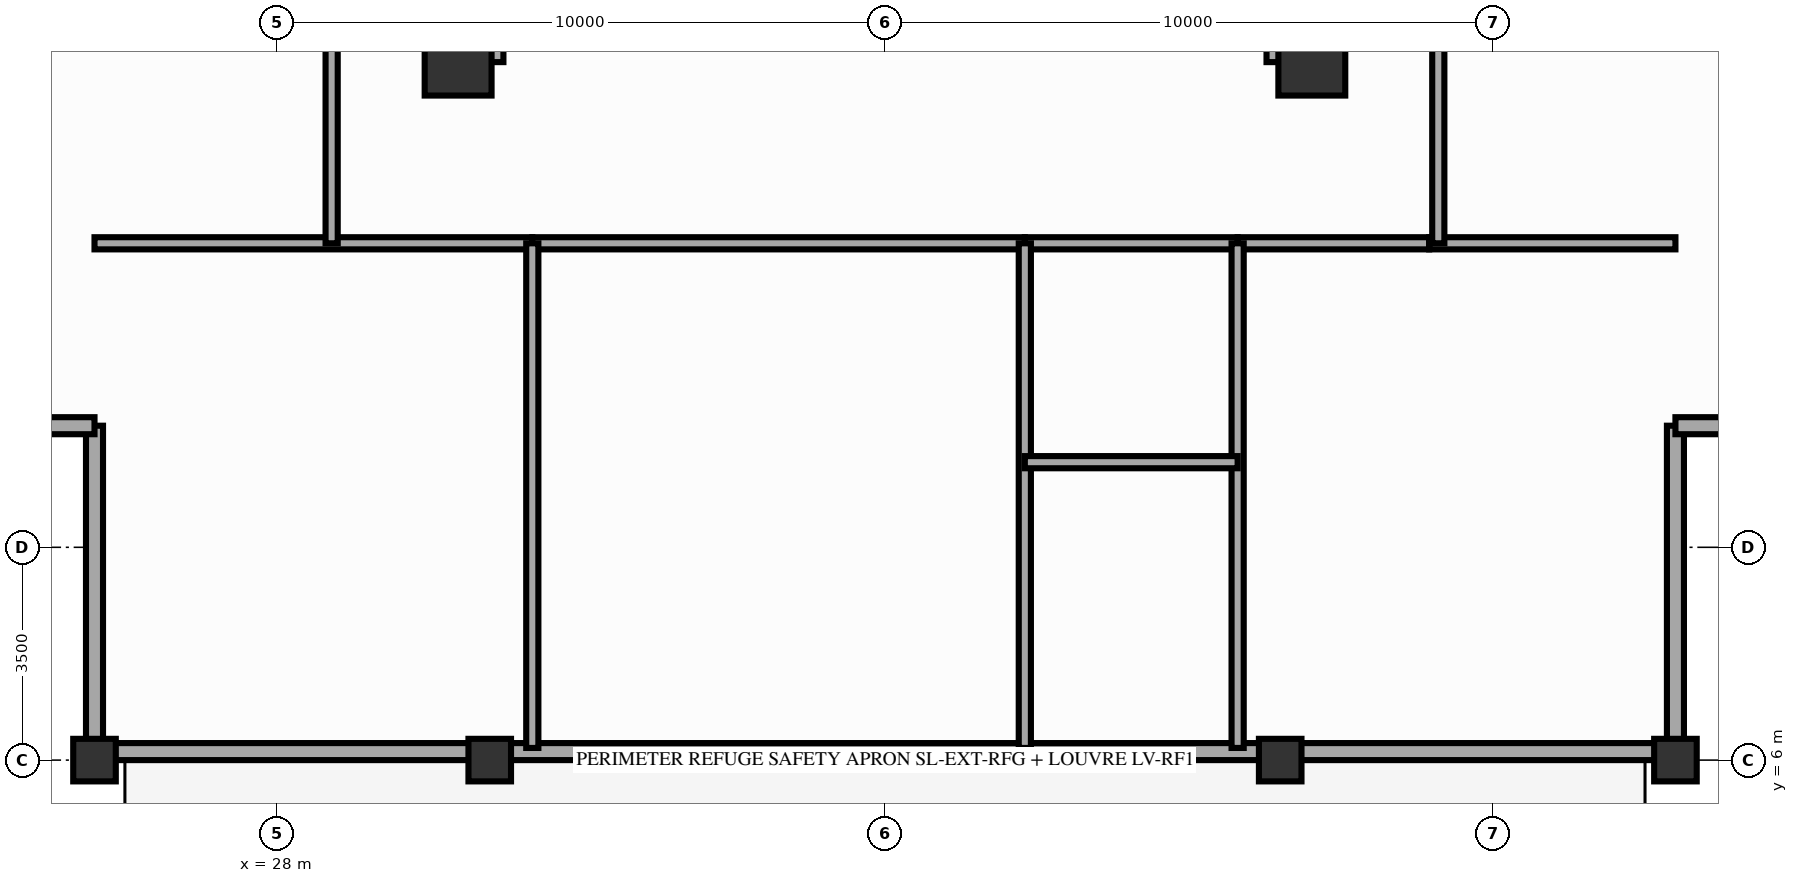
"""IFC4 building model, lengths in metres.
Left out: names, types, materials, properties, quantities, classifications, styles, units other than length and angle.
Written with IfcOpenShell. Run it as: python <this file> out.ifc"""

import sys

from ifc_helpers import new_model, si_unit, direction, frame, frame_2d, origin, origin_2d, place, context, subcontext, project, spatial, rectangle, extrude, source, transform, mapped, element, fill, save


model = new_model("IFC4")
c1 = context("Model", 3, precision=1e-05, world=origin(), true_north=direction((0.0, 1.0)))
c2 = subcontext(c1, "Body", "Model", "MODEL_VIEW")
j1 = project(units=[si_unit("LENGTHUNIT", "METRE"), si_unit("PLANEANGLEUNIT", "RADIAN")], contexts=[c1])
p1 = place(None, origin())
s1 = spatial("IfcSite", under=j1, at=p1, CompositionType="ELEMENT")
p2 = place(p1, origin())
s2 = spatial("IfcBuilding", under=s1, at=p2, CompositionType="ELEMENT")
p3 = place(p2, frame((0.0, 0.0, 206.5)))
s3 = spatial("IfcBuildingStorey", under=s2, at=p3, CompositionType="ELEMENT", Elevation=206.5)
p4 = place(p3, frame((31.5, 17.48, 0.0), z_axis=(0.0, 0.0, 1.0), x_axis=(0.0, 1.0, 0.0)))
e1 = element("IfcWall", 1, at=p4, inside=s3, PredefinedType="SHEAR", context=c2, shape_type="SweptSolid", body=[
    extrude(rectangle(XDim=19.04, YDim=0.45, at=frame_2d((9.52, 0.0))), origin(), (0.0, 0.0, 1.0), 3.8),
])
p5 = place(p4, frame((6.32, 0.0, 0.0)))
e2 = element("IfcOpeningElement", 2, at=p5, cuts=e1, PredefinedType="OPENING", context=c2, shape_type="SweptSolid", body=[
    extrude(rectangle(XDim=1.1, YDim=2.15, at=frame_2d((0.55, 1.075))), frame((0.0, 0.237, 0.0), z_axis=(0.0, -1.0, 0.0), x_axis=(1.0, 0.0, 0.0)), (0.0, 0.0, 1.0), 0.474),
])
p6 = place(p3, frame((44.5, 17.48, 0.0), z_axis=(0.0, 0.0, 1.0), x_axis=(0.0, 1.0, 0.0)))
e3 = element("IfcWall", 3, at=p6, inside=s3, PredefinedType="SHEAR", context=c2, shape_type="SweptSolid", body=[
    extrude(rectangle(XDim=19.04, YDim=0.45, at=frame_2d((9.52, 0.0))), origin(), (0.0, 0.0, 1.0), 3.8),
])
p7 = place(p6, frame((12.67, 0.0, 0.0), z_axis=(0.0, 0.0, 1.0), x_axis=(-1.0, 0.0, 0.0)))
e4 = element("IfcOpeningElement", 4, at=p7, cuts=e3, PredefinedType="OPENING", context=c2, shape_type="SweptSolid", body=[
    extrude(rectangle(XDim=1.1, YDim=2.15, at=frame_2d((0.55, 1.075))), frame((0.0, 0.237, 0.0), z_axis=(0.0, -1.0, 0.0), x_axis=(1.0, 0.0, 0.0)), (0.0, 0.0, 1.0), 0.474),
])
m1 = source(origin(), c2, "Body", "SweptSolid", [
    extrude(rectangle(XDim=1.1, YDim=1.1, at=origin_2d()), origin(), (0.0, 0.0, 1.0), 3.8),
])
for number, where, z_axis, x_axis in (
    (5, (30.98, 17.48, 0.0), (0.0, 0.0, 1.0), (1.0, 0.0, 0.0)),
    (6, (45.02, 17.48, 0.0), (0.0, 0.0, 1.0), (1.0, 0.0, 0.0)),
):
    element("IfcColumn", number, at=place(p3, frame(where, z_axis=z_axis, x_axis=x_axis)), inside=s3, PredefinedType="COLUMN", context=c2, shape_type="MappedRepresentation", body=[
        mapped(m1, transform((0.0, 0.0, 0.0), scale=1.0)),
    ])
m2 = source(origin(), c2, "Body", "SweptSolid", [
    extrude(rectangle(XDim=0.7, YDim=0.7, at=origin_2d()), origin(), (0.0, 0.0, 1.0), 3.8),
])
for number, where, z_axis, x_axis in (
    (7, (25.0, 6.0, 0.0), (0.0, 0.0, 1.0), (1.0, 0.0, 0.0)),
    (8, (31.5, 6.0, 0.0), (0.0, 0.0, 1.0), (1.0, 0.0, 0.0)),
    (9, (44.5, 6.0, 0.0), (0.0, 0.0, 1.0), (1.0, 0.0, 0.0)),
    (10, (51.0, 6.0, 0.0), (0.0, 0.0, 1.0), (1.0, 0.0, 0.0)),
):
    element("IfcColumn", number, at=place(p3, frame(where, z_axis=z_axis, x_axis=x_axis)), inside=s3, PredefinedType="COLUMN", context=c2, shape_type="MappedRepresentation", body=[
        mapped(m2, transform((0.0, 0.0, 0.0), scale=1.0)),
    ])
p8 = place(p3, frame((25.0, 6.14, 0.0), z_axis=(0.0, 0.0, 1.0), x_axis=(1.0, 0.0, 0.0)))
e11 = element("IfcWall", 11, at=p8, inside=s3, PredefinedType="SOLIDWALL", context=c2, shape_type="SweptSolid", body=[
    extrude(rectangle(XDim=26.0, YDim=0.28, at=frame_2d((13.0, 0.0))), origin(), (0.0, 0.0, 1.0), 2.34),
])
p9 = place(p8, frame((9.2, 0.0, 0.45)))
e12 = element("IfcOpeningElement", 12, at=p9, cuts=e11, PredefinedType="OPENING", context=c2, shape_type="SweptSolid", body=[
    extrude(rectangle(XDim=1.2, YDim=0.9, at=frame_2d((0.6, 0.45))), frame((0.0, 0.152, 0.0), z_axis=(0.0, -1.0, 0.0), x_axis=(1.0, 0.0, 0.0)), (0.0, 0.0, 1.0), 0.304),
])
p10 = place(p8, frame((16.2, 0.0, 0.45)))
e13 = element("IfcOpeningElement", 13, at=p10, cuts=e11, PredefinedType="OPENING", context=c2, shape_type="SweptSolid", body=[
    extrude(rectangle(XDim=1.2, YDim=0.9, at=frame_2d((0.6, 0.45))), frame((0.0, 0.152, 0.0), z_axis=(0.0, -1.0, 0.0), x_axis=(1.0, 0.0, 0.0)), (0.0, 0.0, 1.0), 0.304),
])
for number, where, z_axis, x_axis in (
    (14, (25.0, 6.0, 0.0), (0.0, 0.0, 1.0), (0.0, 1.0, 0.0)),
    (15, (19.5, 11.5, 0.0), (0.0, 0.0, 1.0), (1.0, 0.0, 0.0)),
    (16, (51.0, 6.0, 0.0), (0.0, 0.0, 1.0), (0.0, 1.0, 0.0)),
    (17, (51.0, 11.5, 0.0), (0.0, 0.0, 1.0), (1.0, 0.0, 0.0)),
):
    element("IfcWall", number, at=place(p3, frame(where, z_axis=z_axis, x_axis=x_axis)), inside=s3, PredefinedType="SOLIDWALL", context=c2, shape_type="SweptSolid", body=[
        extrude(rectangle(XDim=5.5, YDim=0.28, at=frame_2d((2.75, 0.0))), origin(), (0.0, 0.0, 1.0), 2.34),
    ])
p11 = place(p3, frame((25.0, 14.5, 0.0), z_axis=(0.0, 0.0, 1.0), x_axis=(1.0, 0.0, 0.0)))
e18 = element("IfcWall", 18, at=p11, inside=s3, PredefinedType="PARTITIONING", context=c2, shape_type="SweptSolid", body=[
    extrude(rectangle(XDim=7.2, YDim=0.2, at=frame_2d((3.6, 0.0))), origin(), (0.0, 0.0, 1.0), 3.59),
])
p12 = place(p11, frame((4.5, 0.0, 0.0)))
e19 = element("IfcOpeningElement", 19, at=p12, cuts=e18, PredefinedType="OPENING", context=c2, shape_type="SweptSolid", body=[
    extrude(rectangle(XDim=1.1, YDim=2.15, at=frame_2d((0.55, 1.075))), frame((0.0, 0.112, 0.0), z_axis=(0.0, -1.0, 0.0), x_axis=(1.0, 0.0, 0.0)), (0.0, 0.0, 1.0), 0.224),
])
p13 = place(p3, frame((32.2, 14.5, 0.0), z_axis=(0.0, 0.0, 1.0), x_axis=(1.0, 0.0, 0.0)))
e20 = element("IfcWall", 20, at=p13, inside=s3, PredefinedType="PARTITIONING", context=c2, shape_type="SweptSolid", body=[
    extrude(rectangle(XDim=8.1, YDim=0.2, at=frame_2d((4.05, 0.0))), origin(), (0.0, 0.0, 1.0), 3.59),
])
p14 = place(p13, frame((3.5, 0.0, 0.0)))
e21 = element("IfcOpeningElement", 21, at=p14, cuts=e20, PredefinedType="OPENING", context=c2, shape_type="SweptSolid", body=[
    extrude(rectangle(XDim=1.1, YDim=2.15, at=frame_2d((0.55, 1.075))), frame((0.0, 0.112, 0.0), z_axis=(0.0, -1.0, 0.0), x_axis=(1.0, 0.0, 0.0)), (0.0, 0.0, 1.0), 0.224),
])
p15 = place(p3, frame((40.3, 14.5, 0.0), z_axis=(0.0, 0.0, 1.0), x_axis=(1.0, 0.0, 0.0)))
e22 = element("IfcWall", 22, at=p15, inside=s3, PredefinedType="PARTITIONING", context=c2, shape_type="SweptSolid", body=[
    extrude(rectangle(XDim=3.5, YDim=0.2, at=frame_2d((1.75, 0.0))), origin(), (0.0, 0.0, 1.0), 3.59),
])
p16 = place(p15, frame((1.25, 0.0, 0.0)))
e23 = element("IfcOpeningElement", 23, at=p16, cuts=e22, PredefinedType="OPENING", context=c2, shape_type="SweptSolid", body=[
    extrude(rectangle(XDim=1.0, YDim=2.1, at=frame_2d((0.5, 1.05))), frame((0.0, 0.112, 0.0), z_axis=(0.0, -1.0, 0.0), x_axis=(1.0, 0.0, 0.0)), (0.0, 0.0, 1.0), 0.224),
])
p17 = place(p3, frame((43.8, 14.5, 0.0), z_axis=(0.0, 0.0, 1.0), x_axis=(1.0, 0.0, 0.0)))
e24 = element("IfcWall", 24, at=p17, inside=s3, PredefinedType="PARTITIONING", context=c2, shape_type="SweptSolid", body=[
    extrude(rectangle(XDim=3.15, YDim=0.2, at=frame_2d((1.575, 0.0))), origin(), (0.0, 0.0, 1.0), 3.59),
])
p18 = place(p17, frame((0.928, 0.0, 0.0)))
e25 = element("IfcOpeningElement", 25, at=p18, cuts=e24, PredefinedType="OPENING", context=c2, shape_type="SweptSolid", body=[
    extrude(rectangle(XDim=1.1, YDim=2.15, at=frame_2d((0.55, 1.075))), frame((0.0, 0.112, 0.0), z_axis=(0.0, -1.0, 0.0), x_axis=(1.0, 0.0, 0.0)), (0.0, 0.0, 1.0), 0.224),
])
p19 = place(p3, frame((46.95, 14.5, 0.0), z_axis=(0.0, 0.0, 1.0), x_axis=(1.0, 0.0, 0.0)))
e26 = element("IfcWall", 26, at=p19, inside=s3, PredefinedType="PARTITIONING", context=c2, shape_type="SweptSolid", body=[
    extrude(rectangle(XDim=4.05, YDim=0.2, at=frame_2d((2.025, 0.0))), origin(), (0.0, 0.0, 1.0), 3.59),
])
for number, where, z_axis, x_axis in (
    (27, (32.2, 6.2, 0.0), (0.0, 0.0, 1.0), (0.0, 1.0, 0.0)),
    (28, (40.3, 6.2, 0.0), (0.0, 0.0, 1.0), (0.0, 1.0, 0.0)),
    (29, (43.8, 6.2, 0.0), (0.0, 0.0, 1.0), (0.0, 1.0, 0.0)),
):
    element("IfcWall", number, at=place(p3, frame(where, z_axis=z_axis, x_axis=x_axis)), inside=s3, PredefinedType="PARTITIONING", context=c2, shape_type="SweptSolid", body=[
        extrude(rectangle(XDim=8.3, YDim=0.2, at=frame_2d((4.15, 0.0))), origin(), (0.0, 0.0, 1.0), 3.59),
    ])
p20 = place(p3, frame((40.3, 10.9, 0.0), z_axis=(0.0, 0.0, 1.0), x_axis=(1.0, 0.0, 0.0)))
e30 = element("IfcWall", 30, at=p20, inside=s3, PredefinedType="PARTITIONING", context=c2, shape_type="SweptSolid", body=[
    extrude(rectangle(XDim=3.5, YDim=0.2, at=frame_2d((1.75, 0.0))), origin(), (0.0, 0.0, 1.0), 3.59),
])
p21 = place(p3, frame((28.9, 14.5, 0.0), z_axis=(0.0, 0.0, 1.0), x_axis=(0.0, 1.0, 0.0)))
e31 = element("IfcWall", 31, at=p21, inside=s3, PredefinedType="PARTITIONING", context=c2, shape_type="SweptSolid", body=[
    extrude(rectangle(XDim=24.8, YDim=0.2, at=frame_2d((12.4, 0.0))), origin(), (0.0, 0.0, 1.0), 3.59),
])
p22 = place(p21, frame((11.85, 0.0, 0.0)))
e32 = element("IfcOpeningElement", 32, at=p22, cuts=e31, PredefinedType="OPENING", context=c2, shape_type="SweptSolid", body=[
    extrude(rectangle(XDim=1.1, YDim=2.15, at=frame_2d((0.55, 1.075))), frame((0.0, 0.112, 0.0), z_axis=(0.0, -1.0, 0.0), x_axis=(1.0, 0.0, 0.0)), (0.0, 0.0, 1.0), 0.224),
])
p23 = place(p3, frame((47.1, 14.5, 0.0), z_axis=(0.0, 0.0, 1.0), x_axis=(0.0, 1.0, 0.0)))
e33 = element("IfcWall", 33, at=p23, inside=s3, PredefinedType="PARTITIONING", context=c2, shape_type="SweptSolid", body=[
    extrude(rectangle(XDim=24.8, YDim=0.2, at=frame_2d((12.4, 0.0))), origin(), (0.0, 0.0, 1.0), 3.59),
])
p24 = place(p23, frame((11.85, 0.0, 0.0)))
e34 = element("IfcOpeningElement", 34, at=p24, cuts=e33, PredefinedType="OPENING", context=c2, shape_type="SweptSolid", body=[
    extrude(rectangle(XDim=1.1, YDim=2.15, at=frame_2d((0.55, 1.075))), frame((0.0, 0.112, 0.0), z_axis=(0.0, -1.0, 0.0), x_axis=(1.0, 0.0, 0.0)), (0.0, 0.0, 1.0), 0.224),
])
m3 = source(origin(), c2, "Body", "SweptSolid", [
    extrude(rectangle(XDim=1.2, YDim=0.9, at=frame_2d((0.6, 0.45))), frame((0.0, 0.03, 0.0), z_axis=(0.0, -1.0, 0.0), x_axis=(1.0, 0.0, 0.0)), (0.0, 0.0, 1.0), 0.06),
])
p25 = place(p9, origin())
e35 = element("IfcWindow", 35, at=p25, inside=s3, PartitioningType="SINGLE_PANEL", PredefinedType="WINDOW", context=c2, shape_type="MappedRepresentation", body=[
    mapped(m3, transform((0.0, 0.0, 0.0), scale=1.0)),
])
fill(e12, e35)
p26 = place(p10, origin())
e36 = element("IfcWindow", 36, at=p26, inside=s3, PartitioningType="SINGLE_PANEL", PredefinedType="WINDOW", context=c2, shape_type="MappedRepresentation", body=[
    mapped(m3, transform((0.0, 0.0, 0.0), scale=1.0)),
])
fill(e13, e36)
m4 = source(origin(), c2, "Body", "SweptSolid", [
    extrude(rectangle(XDim=1.1, YDim=2.15, at=frame_2d((0.55, 1.075))), frame((0.0, 0.025, 0.0), z_axis=(0.0, -1.0, 0.0), x_axis=(1.0, 0.0, 0.0)), (0.0, 0.0, 1.0), 0.05),
])
p27 = place(p12, origin())
e37 = element("IfcDoor", 37, at=p27, inside=s3, OperationType="SINGLE_SWING_LEFT", PredefinedType="DOOR", context=c2, shape_type="MappedRepresentation", body=[
    mapped(m4, transform((0.0, 0.0, 0.0), scale=1.0)),
])
fill(e19, e37)
p28 = place(p14, origin())
e38 = element("IfcDoor", 38, at=p28, inside=s3, OperationType="SINGLE_SWING_RIGHT", PredefinedType="DOOR", context=c2, shape_type="MappedRepresentation", body=[
    mapped(m4, transform((0.0, 0.0, 0.0), scale=1.0)),
])
fill(e21, e38)
m5 = source(origin(), c2, "Body", "SweptSolid", [
    extrude(rectangle(XDim=1.0, YDim=2.1, at=frame_2d((0.5, 1.05))), frame((0.0, 0.025, 0.0), z_axis=(0.0, -1.0, 0.0), x_axis=(1.0, 0.0, 0.0)), (0.0, 0.0, 1.0), 0.05),
])
p29 = place(p16, origin())
e39 = element("IfcDoor", 39, at=p29, inside=s3, OperationType="SINGLE_SWING_LEFT", PredefinedType="DOOR", context=c2, shape_type="MappedRepresentation", body=[
    mapped(m5, transform((0.0, 0.0, 0.0), scale=1.0)),
])
fill(e23, e39)
p30 = place(p18, origin())
e40 = element("IfcDoor", 40, at=p30, inside=s3, OperationType="SINGLE_SWING_RIGHT", PredefinedType="DOOR", context=c2, shape_type="MappedRepresentation", body=[
    mapped(m4, transform((0.0, 0.0, 0.0), scale=1.0)),
])
fill(e25, e40)
save(model, sys.argv[1])
